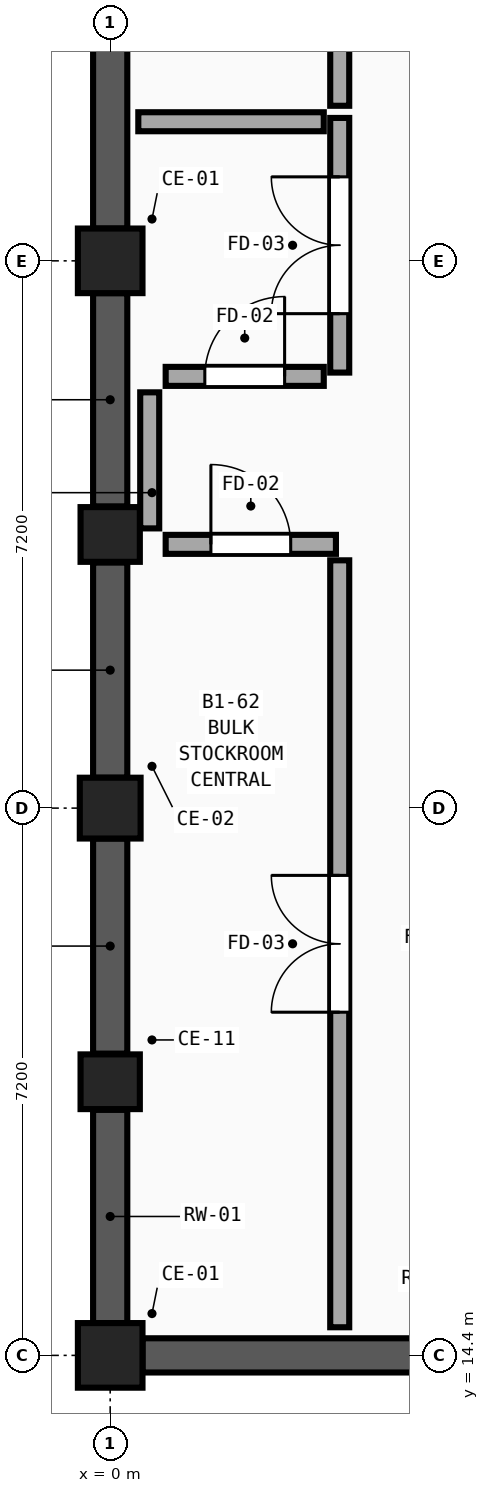
"""IFC4 building model, lengths in metres.
Left out: names, types, materials, properties, quantities, classifications, styles, units other than length and angle.
Written with IfcOpenShell. Run it as: python <this file> out.ifc"""

import sys

from ifc_helpers import new_model, si_unit, direction, frame, frame_2d, origin, origin_2d, place, context, subcontext, project, spatial, rectangle, extrude, element, fill, save


model = new_model("IFC4")
c1 = context("Model", 3, precision=1e-05, world=origin(), true_north=direction((0.0, 1.0)))
c2 = subcontext(c1, "Body", "Model", "MODEL_VIEW")
j1 = project(units=[si_unit("LENGTHUNIT", "METRE"), si_unit("PLANEANGLEUNIT", "RADIAN")], contexts=[c1])
p1 = place(None, origin())
s1 = spatial("IfcSite", under=j1, at=p1, CompositionType="ELEMENT")
p2 = place(p1, origin())
s2 = spatial("IfcBuilding", under=s1, at=p2, CompositionType="ELEMENT")
p3 = place(p2, frame((0.0, 0.0, -5.4)))
s3 = spatial("IfcBuildingStorey", under=s2, at=p3, CompositionType="ELEMENT", Elevation=-5.4)
p4 = place(p3, frame((0.0, 14.4, 0.0), z_axis=(0.0, 0.0, 1.0), x_axis=(1.0, 0.0, 0.0)))
e1 = element("IfcColumn", 1, at=p4, inside=s3, PredefinedType="COLUMN", context=c2, shape_type="SweptSolid", body=[
    extrude(rectangle(XDim=0.85, YDim=0.85, at=origin_2d()), origin(), (0.0, 0.0, 1.0), 5.4),
])
p5 = place(p3, frame((0.0, 21.6, 0.0), z_axis=(0.0, 0.0, 1.0), x_axis=(1.0, 0.0, 0.0)))
e2 = element("IfcColumn", 2, at=p5, inside=s3, PredefinedType="COLUMN", context=c2, shape_type="SweptSolid", body=[
    extrude(rectangle(XDim=0.8, YDim=0.8, at=origin_2d()), origin(), (0.0, 0.0, 1.0), 5.4),
])
p6 = place(p3, frame((0.0, 28.8, 0.0), z_axis=(0.0, 0.0, 1.0), x_axis=(1.0, 0.0, 0.0)))
e3 = element("IfcColumn", 3, at=p6, inside=s3, PredefinedType="COLUMN", context=c2, shape_type="SweptSolid", body=[
    extrude(rectangle(XDim=0.85, YDim=0.85, at=origin_2d()), origin(), (0.0, 0.0, 1.0), 5.4),
])
for number, where, z_axis, x_axis in (
    (4, (0.0, 18.0, 0.0), (0.0, 0.0, 1.0), (1.0, 0.0, 0.0)),
    (5, (0.0, 25.2, 0.0), (0.0, 0.0, 1.0), (1.0, 0.0, 0.0)),
):
    element("IfcColumn", number, at=place(p3, frame(where, z_axis=z_axis, x_axis=x_axis)), inside=s3, PredefinedType="PILASTER", context=c2, shape_type="SweptSolid", body=[
        extrude(rectangle(XDim=0.78, YDim=0.72, at=origin_2d()), origin(), (0.0, 0.0, 1.0), 5.4),
    ])
p7 = place(p3, frame((8.0, 14.4, 0.0), z_axis=(0.0, 0.0, 1.0), x_axis=(-1.0, 0.0, 0.0)))
e6 = element("IfcWall", 6, at=p7, inside=s3, PredefinedType="USERDEFINED", context=c2, shape_type="SweptSolid", body=[
    extrude(rectangle(XDim=7.575, YDim=0.45, at=frame_2d((3.788, 0.0))), origin(), (0.0, 0.0, 1.0), 4.5),
])
p8 = place(p3, frame((0.0, 14.825, 0.0), z_axis=(0.0, 0.0, 1.0), x_axis=(0.0, 1.0, 0.0)))
e7 = element("IfcWall", 7, at=p8, inside=s3, PredefinedType="USERDEFINED", context=c2, shape_type="SweptSolid", body=[
    extrude(rectangle(XDim=2.805, YDim=0.45, at=frame_2d((1.402, 0.0))), origin(), (0.0, 0.0, 1.0), 4.5),
])
p9 = place(p3, frame((0.0, 18.37, 0.0), z_axis=(0.0, 0.0, 1.0), x_axis=(0.0, 1.0, 0.0)))
e8 = element("IfcWall", 8, at=p9, inside=s3, PredefinedType="USERDEFINED", context=c2, shape_type="SweptSolid", body=[
    extrude(rectangle(XDim=2.83, YDim=0.45, at=frame_2d((1.415, 0.0))), origin(), (0.0, 0.0, 1.0), 4.5),
])
p10 = place(p3, frame((0.0, 22.0, 0.0), z_axis=(0.0, 0.0, 1.0), x_axis=(0.0, 1.0, 0.0)))
e9 = element("IfcWall", 9, at=p10, inside=s3, PredefinedType="USERDEFINED", context=c2, shape_type="SweptSolid", body=[
    extrude(rectangle(XDim=2.83, YDim=0.45, at=frame_2d((1.415, 0.0))), origin(), (0.0, 0.0, 1.0), 4.5),
])
p11 = place(p3, frame((0.0, 25.57, 0.0), z_axis=(0.0, 0.0, 1.0), x_axis=(0.0, 1.0, 0.0)))
e10 = element("IfcWall", 10, at=p11, inside=s3, PredefinedType="USERDEFINED", context=c2, shape_type="SweptSolid", body=[
    extrude(rectangle(XDim=2.805, YDim=0.45, at=frame_2d((1.402, 0.0))), origin(), (0.0, 0.0, 1.0), 4.5),
])
p12 = place(p3, frame((0.0, 29.225, 0.0), z_axis=(0.0, 0.0, 1.0), x_axis=(0.0, 1.0, 0.0)))
e11 = element("IfcWall", 11, at=p12, inside=s3, PredefinedType="USERDEFINED", context=c2, shape_type="SweptSolid", body=[
    extrude(rectangle(XDim=6.375, YDim=0.45, at=frame_2d((3.188, 0.0))), origin(), (0.0, 0.0, 1.0), 4.5),
])
p13 = place(p3, frame((3.02, 30.84, 0.0), z_axis=(0.0, 0.0, 1.0), x_axis=(0.0, 1.0, 0.0)))
e12 = element("IfcWall", 12, at=p13, inside=s3, PredefinedType="SOLIDWALL", context=c2, shape_type="SweptSolid", body=[
    extrude(rectangle(XDim=12.52, YDim=0.25, at=frame_2d((6.26, 0.0))), origin(), (0.0, 0.0, 1.0), 5.05),
])
p14 = place(p13, frame((5.36, 0.0, 0.0)))
e13 = element("IfcOpeningElement", 13, at=p14, cuts=e12, PredefinedType="OPENING", context=c2, shape_type="SweptSolid", body=[
    extrude(rectangle(XDim=1.8, YDim=2.3, at=frame_2d((0.9, 1.15))), frame((0.0, 0.145, 0.0), z_axis=(0.0, -1.0, 0.0), x_axis=(1.0, 0.0, 0.0)), (0.0, 0.0, 1.0), 0.29),
])
p15 = place(p3, frame((3.02, 14.77, 0.0), z_axis=(0.0, 0.0, 1.0), x_axis=(0.0, 1.0, 0.0)))
e14 = element("IfcWall", 14, at=p15, inside=s3, PredefinedType="SOLIDWALL", context=c2, shape_type="SweptSolid", body=[
    extrude(rectangle(XDim=10.09, YDim=0.25, at=frame_2d((5.045, 0.0))), origin(), (0.0, 0.0, 1.0), 5.05),
])
p16 = place(p15, frame((4.145, 0.0, 0.0)))
e15 = element("IfcOpeningElement", 15, at=p16, cuts=e14, PredefinedType="OPENING", context=c2, shape_type="SweptSolid", body=[
    extrude(rectangle(XDim=1.8, YDim=2.3, at=frame_2d((0.9, 1.15))), frame((0.0, 0.145, 0.0), z_axis=(0.0, -1.0, 0.0), x_axis=(1.0, 0.0, 0.0)), (0.0, 0.0, 1.0), 0.29),
])
p17 = place(p3, frame((3.02, 27.33, 0.0), z_axis=(0.0, 0.0, 1.0), x_axis=(0.0, 1.0, 0.0)))
e16 = element("IfcWall", 16, at=p17, inside=s3, PredefinedType="SOLIDWALL", context=c2, shape_type="SweptSolid", body=[
    extrude(rectangle(XDim=3.35, YDim=0.25, at=frame_2d((1.675, 0.0))), origin(), (0.0, 0.0, 1.0), 5.05),
])
p18 = place(p17, frame((0.775, 0.0, 0.0)))
e17 = element("IfcOpeningElement", 17, at=p18, cuts=e16, PredefinedType="OPENING", context=c2, shape_type="SweptSolid", body=[
    extrude(rectangle(XDim=1.8, YDim=2.3, at=frame_2d((0.9, 1.15))), frame((0.0, 0.145, 0.0), z_axis=(0.0, -1.0, 0.0), x_axis=(1.0, 0.0, 0.0)), (0.0, 0.0, 1.0), 0.29),
])
p19 = place(p3, frame((0.73, 25.07, 0.0), z_axis=(0.0, 0.0, 1.0), x_axis=(1.0, 0.0, 0.0)))
e18 = element("IfcWall", 18, at=p19, inside=s3, PredefinedType="SOLIDWALL", context=c2, shape_type="SweptSolid", body=[
    extrude(rectangle(XDim=2.24, YDim=0.25, at=frame_2d((1.12, 0.0))), origin(), (0.0, 0.0, 1.0), 5.05),
])
p20 = place(p19, frame((0.595, 0.0, 0.0)))
e19 = element("IfcOpeningElement", 19, at=p20, cuts=e18, PredefinedType="OPENING", context=c2, shape_type="SweptSolid", body=[
    extrude(rectangle(XDim=1.05, YDim=2.15, at=frame_2d((0.525, 1.075))), frame((0.0, 0.145, 0.0), z_axis=(0.0, -1.0, 0.0), x_axis=(1.0, 0.0, 0.0)), (0.0, 0.0, 1.0), 0.29),
])
p21 = place(p3, frame((0.73, 27.28, 0.0), z_axis=(0.0, 0.0, 1.0), x_axis=(1.0, 0.0, 0.0)))
e20 = element("IfcWall", 20, at=p21, inside=s3, PredefinedType="SOLIDWALL", context=c2, shape_type="SweptSolid", body=[
    extrude(rectangle(XDim=2.08, YDim=0.25, at=frame_2d((1.04, 0.0))), origin(), (0.0, 0.0, 1.0), 5.05),
])
p22 = place(p21, frame((0.515, 0.0, 0.0)))
e21 = element("IfcOpeningElement", 21, at=p22, cuts=e20, PredefinedType="OPENING", context=c2, shape_type="SweptSolid", body=[
    extrude(rectangle(XDim=1.05, YDim=2.15, at=frame_2d((0.525, 1.075))), frame((0.0, 0.145, 0.0), z_axis=(0.0, -1.0, 0.0), x_axis=(1.0, 0.0, 0.0)), (0.0, 0.0, 1.0), 0.29),
])
p23 = place(p3, frame((0.52, 25.28, 0.0), z_axis=(0.0, 0.0, 1.0), x_axis=(0.0, 1.0, 0.0)))
e22 = element("IfcWall", 22, at=p23, inside=s3, PredefinedType="SOLIDWALL", context=c2, shape_type="SweptSolid", body=[
    extrude(rectangle(XDim=1.79, YDim=0.25, at=frame_2d((0.895, 0.0))), origin(), (0.0, 0.0, 1.0), 4.5),
])
p24 = place(p3, frame((0.37, 30.63, 0.0), z_axis=(0.0, 0.0, 1.0), x_axis=(1.0, 0.0, 0.0)))
e23 = element("IfcWall", 23, at=p24, inside=s3, PredefinedType="SOLIDWALL", context=c2, shape_type="SweptSolid", body=[
    extrude(rectangle(XDim=2.44, YDim=0.25, at=frame_2d((1.22, 0.0))), origin(), (0.0, 0.0, 1.0), 5.05),
])
p25 = place(p16, origin())
e24 = element("IfcDoor", 24, at=p25, inside=s3, OperationType="DOUBLE_DOOR_SINGLE_SWING", PredefinedType="DOOR", context=c2, shape_type="SweptSolid", body=[
    extrude(rectangle(XDim=1.8, YDim=2.3, at=frame_2d((0.9, 1.15))), frame((0.0, 0.025, 0.0), z_axis=(0.0, -1.0, 0.0), x_axis=(1.0, 0.0, 0.0)), (0.0, 0.0, 1.0), 0.05),
])
fill(e15, e24)
p26 = place(p18, origin())
e25 = element("IfcDoor", 25, at=p26, inside=s3, OperationType="DOUBLE_DOOR_SINGLE_SWING", PredefinedType="DOOR", context=c2, shape_type="SweptSolid", body=[
    extrude(rectangle(XDim=1.8, YDim=2.3, at=frame_2d((0.9, 1.15))), frame((0.0, 0.025, 0.0), z_axis=(0.0, -1.0, 0.0), x_axis=(1.0, 0.0, 0.0)), (0.0, 0.0, 1.0), 0.05),
])
fill(e17, e25)
p27 = place(p20, origin())
e26 = element("IfcDoor", 26, at=p27, inside=s3, OperationType="SINGLE_SWING_LEFT", PredefinedType="DOOR", context=c2, shape_type="SweptSolid", body=[
    extrude(rectangle(XDim=1.05, YDim=2.15, at=frame_2d((0.525, 1.075))), frame((0.0, 0.025, 0.0), z_axis=(0.0, -1.0, 0.0), x_axis=(1.0, 0.0, 0.0)), (0.0, 0.0, 1.0), 0.05),
])
fill(e19, e26)
p28 = place(p22, origin())
e27 = element("IfcDoor", 27, at=p28, inside=s3, OperationType="SINGLE_SWING_RIGHT", PredefinedType="DOOR", context=c2, shape_type="SweptSolid", body=[
    extrude(rectangle(XDim=1.05, YDim=2.15, at=frame_2d((0.525, 1.075))), frame((0.0, 0.025, 0.0), z_axis=(0.0, -1.0, 0.0), x_axis=(1.0, 0.0, 0.0)), (0.0, 0.0, 1.0), 0.05),
])
fill(e21, e27)
save(model, sys.argv[1])
